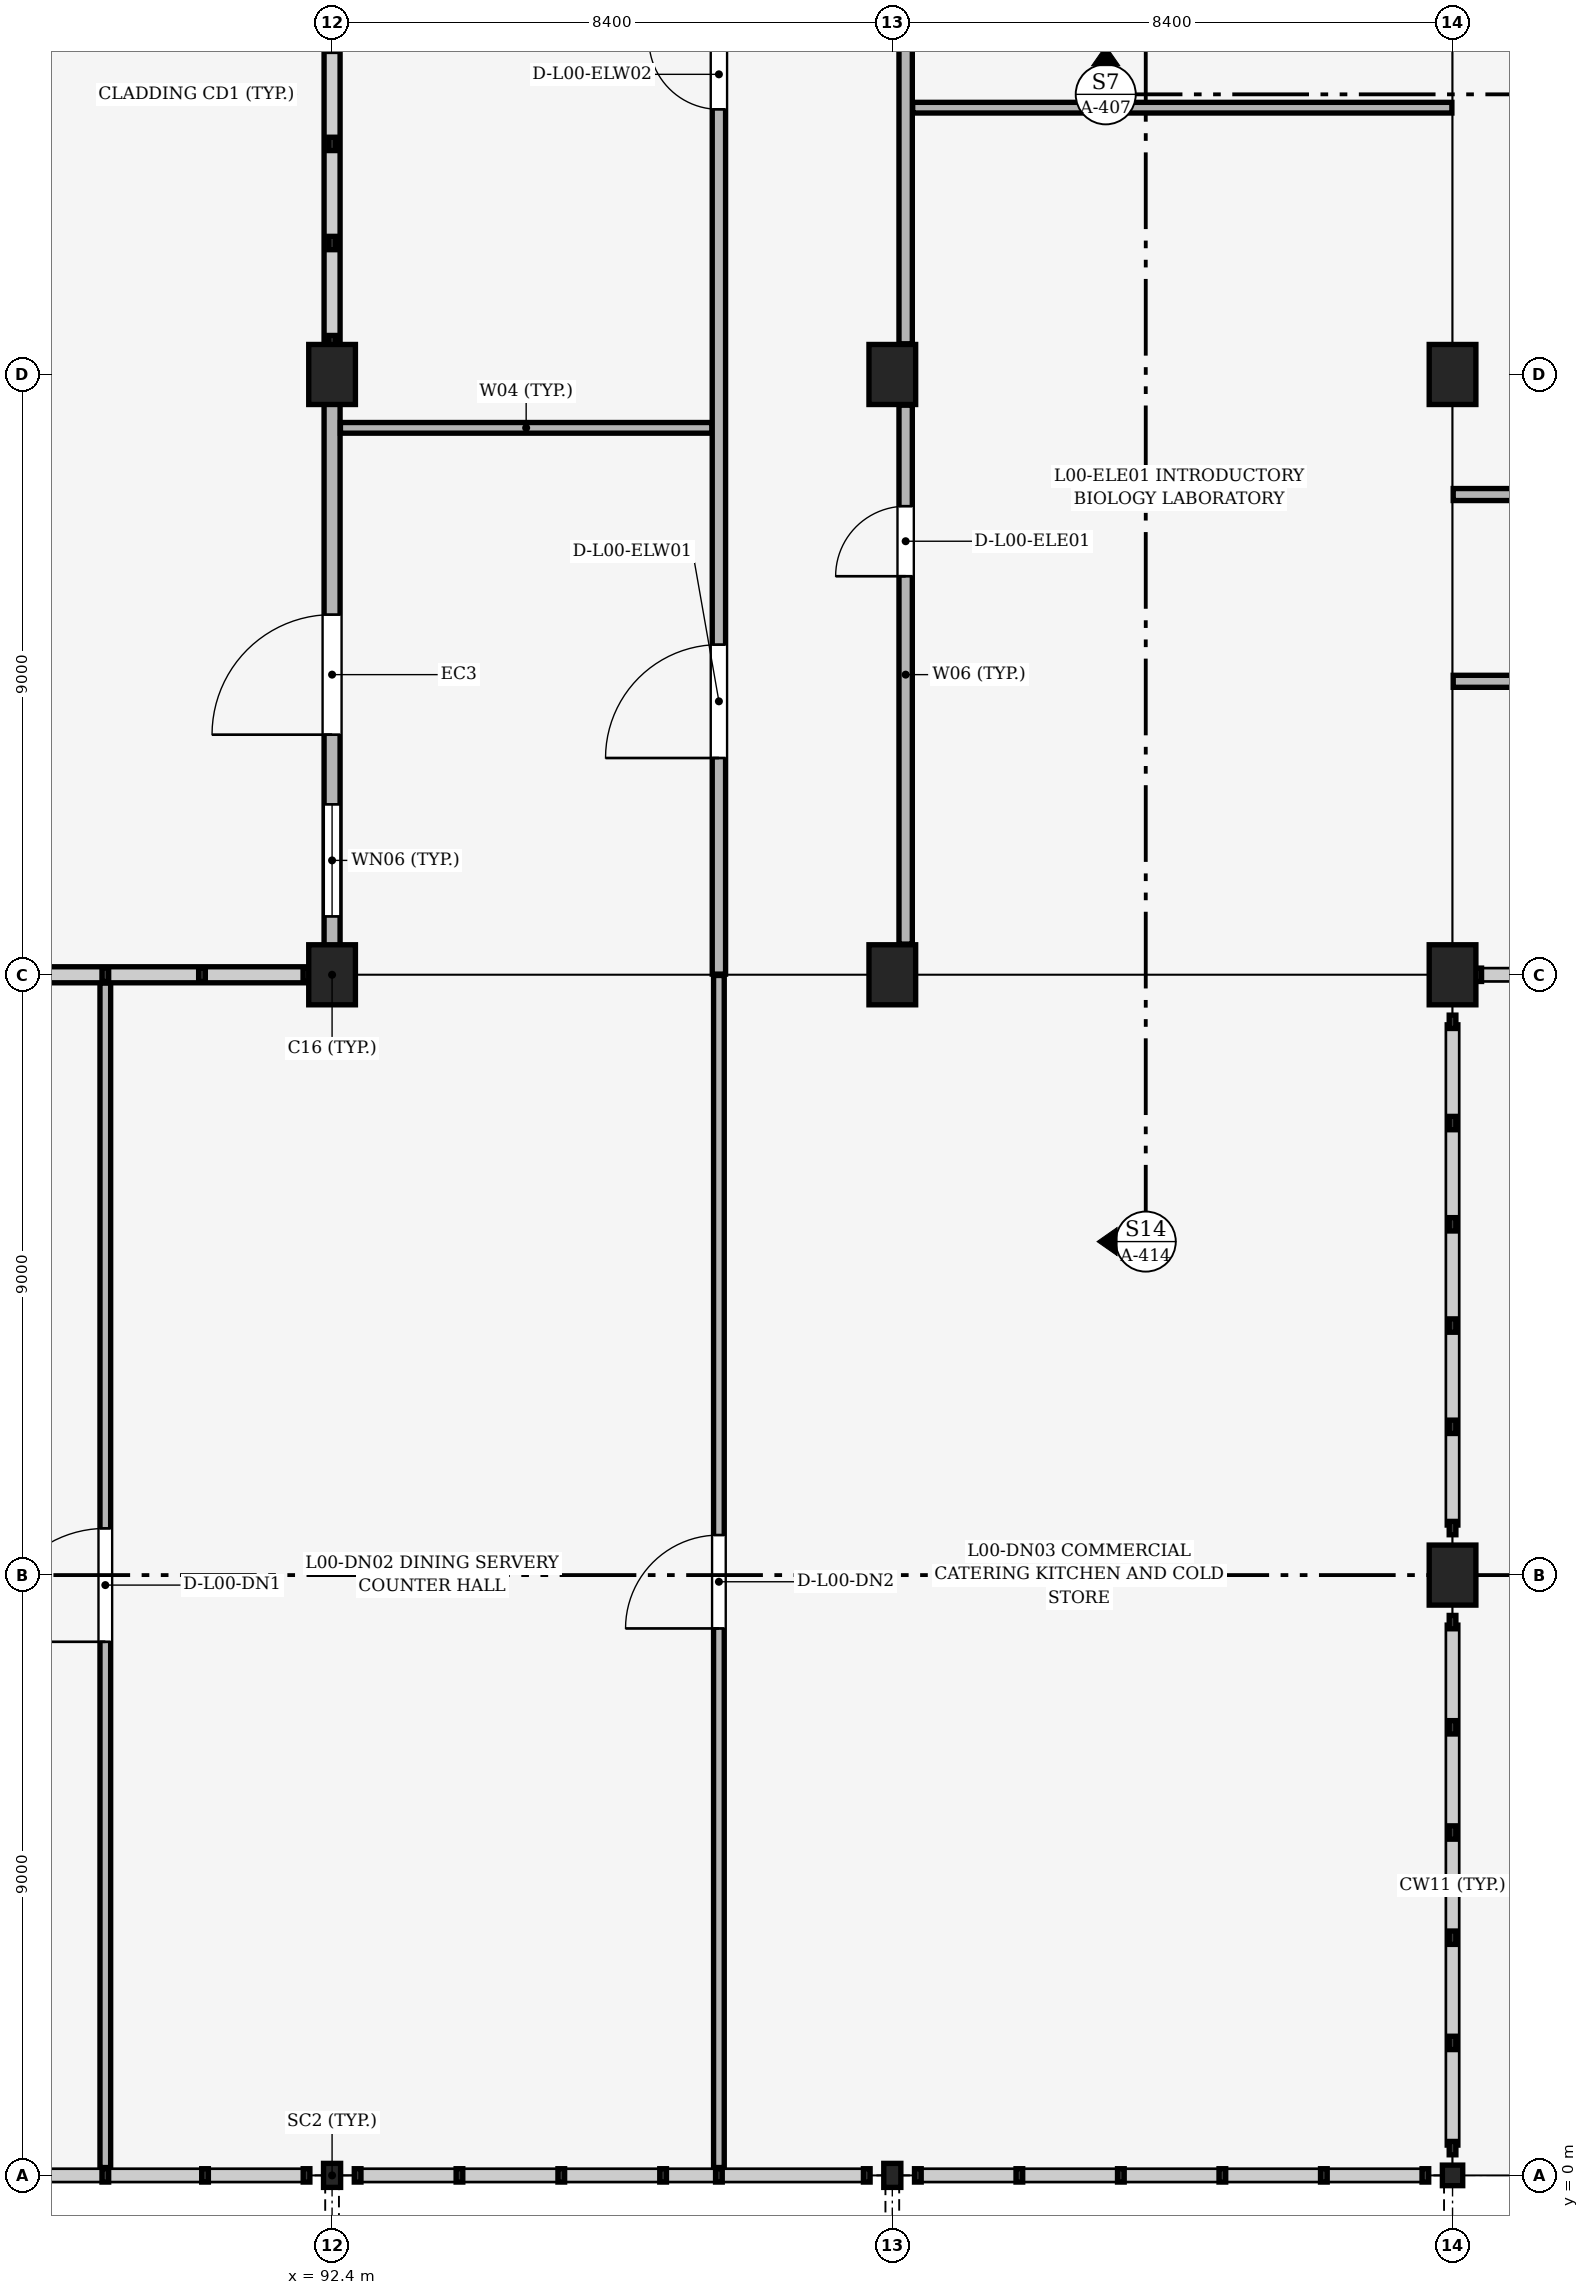
"""IFC4 building model, lengths in metres.
Left out: names, types, materials, properties, quantities, classifications, styles, units other than length and angle.
Written with IfcOpenShell. Run it as: python <this file> out.ifc"""

import sys

from ifc_helpers import new_model, si_unit, direction, frame, frame_2d, origin, origin_2d, place, context, subcontext, project, spatial, rectangle, i_section, extrude, element, fill, save


model = new_model("IFC4")
c1 = context("Model", 3, precision=1e-05, world=origin(), true_north=direction((0.0, 1.0)))
c2 = subcontext(c1, "Body", "Model", "MODEL_VIEW")
j1 = project(units=[si_unit("LENGTHUNIT", "METRE"), si_unit("PLANEANGLEUNIT", "RADIAN")], contexts=[c1])
p1 = place(None, origin())
s1 = spatial("IfcSite", under=j1, at=p1, CompositionType="ELEMENT")
p2 = place(p1, origin())
s2 = spatial("IfcBuilding", under=s1, at=p2, CompositionType="ELEMENT")
p3 = place(p2, origin())
s3 = spatial("IfcBuildingStorey", under=s2, at=p3, CompositionType="ELEMENT", Elevation=0.0)
p4 = place(p3, frame((92.4, 0.0, 0.0), z_axis=(0.0, 0.0, 1.0), x_axis=(1.0, 0.0, 0.0)))
e1 = element("IfcColumn", 1, at=p4, inside=s3, PredefinedType="COLUMN", context=c2, shape_type="SweptSolid", body=[
    extrude(i_section(OverallWidth=0.256, OverallDepth=0.36, WebThickness=0.011, FlangeThickness=0.02, FilletRadius=0.015, at=origin_2d()), origin(), (0.0, 0.0, 1.0), 4.8),
])
for number, where, z_axis, x_axis in (
    (2, (92.4, 18.0, 0.0), (0.0, 0.0, 1.0), (1.0, 0.0, 0.0)),
    (3, (92.4, 27.0, 0.0), (0.0, 0.0, 1.0), (1.0, 0.0, 0.0)),
):
    element("IfcColumn", number, at=place(p3, frame(where, z_axis=z_axis, x_axis=x_axis)), inside=s3, PredefinedType="COLUMN", context=c2, shape_type="SweptSolid", body=[
        extrude(rectangle(XDim=0.7, YDim=0.9, at=origin_2d()), origin(), (0.0, 0.0, 1.0), 4.8),
    ])
p5 = place(p3, frame((100.8, 0.0, 0.0), z_axis=(0.0, 0.0, 1.0), x_axis=(1.0, 0.0, 0.0)))
e4 = element("IfcColumn", 4, at=p5, inside=s3, PredefinedType="COLUMN", context=c2, shape_type="SweptSolid", body=[
    extrude(i_section(OverallWidth=0.256, OverallDepth=0.36, WebThickness=0.011, FlangeThickness=0.02, FilletRadius=0.015, at=origin_2d()), origin(), (0.0, 0.0, 1.0), 4.8),
])
for number, where, z_axis, x_axis in (
    (5, (100.8, 18.0, 0.0), (0.0, 0.0, 1.0), (1.0, 0.0, 0.0)),
    (6, (100.8, 27.0, 0.0), (0.0, 0.0, 1.0), (1.0, 0.0, 0.0)),
):
    element("IfcColumn", number, at=place(p3, frame(where, z_axis=z_axis, x_axis=x_axis)), inside=s3, PredefinedType="COLUMN", context=c2, shape_type="SweptSolid", body=[
        extrude(rectangle(XDim=0.7, YDim=0.9, at=origin_2d()), origin(), (0.0, 0.0, 1.0), 4.8),
    ])
p6 = place(p3, frame((109.2, 0.0, 0.0), z_axis=(0.0, 0.0, 1.0), x_axis=(1.0, 0.0, 0.0)))
e7 = element("IfcColumn", 7, at=p6, inside=s3, PredefinedType="COLUMN", context=c2, shape_type="SweptSolid", body=[
    extrude(i_section(OverallWidth=0.305, OverallDepth=0.308, WebThickness=0.01, FlangeThickness=0.015, FilletRadius=0.013, at=origin_2d()), origin(), (0.0, 0.0, 1.0), 4.8),
])
for number, where, z_axis, x_axis in (
    (8, (109.2, 9.0, 0.0), (0.0, 0.0, 1.0), (1.0, 0.0, 0.0)),
    (9, (109.2, 18.0, 0.0), (0.0, 0.0, 1.0), (1.0, 0.0, 0.0)),
    (10, (109.2, 27.0, 0.0), (0.0, 0.0, 1.0), (1.0, 0.0, 0.0)),
):
    element("IfcColumn", number, at=place(p3, frame(where, z_axis=z_axis, x_axis=x_axis)), inside=s3, PredefinedType="COLUMN", context=c2, shape_type="SweptSolid", body=[
        extrude(rectangle(XDim=0.7, YDim=0.9, at=origin_2d()), origin(), (0.0, 0.0, 1.0), 4.8),
    ])
p7 = place(p3, frame((92.4, 18.425, 0.0), z_axis=(0.0, 0.0, 1.0), x_axis=(0.0, 1.0, 0.0)))
e11 = element("IfcWall", 11, at=p7, inside=s3, PredefinedType="SOLIDWALL", context=c2, shape_type="SweptSolid", body=[
    extrude(rectangle(XDim=8.15, YDim=0.24, at=frame_2d((4.075, 0.0))), origin(), (0.0, 0.0, 1.0), 3.72),
])
p8 = place(p7, frame((3.175, 0.0, 0.0)))
e12 = element("IfcOpeningElement", 12, at=p8, cuts=e11, PredefinedType="OPENING", context=c2, shape_type="SweptSolid", body=[
    extrude(rectangle(XDim=1.8, YDim=2.35, at=frame_2d((0.9, 1.175))), frame((0.0, 0.13, 0.0), z_axis=(0.0, -1.0, 0.0), x_axis=(1.0, 0.0, 0.0)), (0.0, 0.0, 1.0), 0.26),
])
p9 = place(p7, frame((0.45, 0.0, 0.95)))
e13 = element("IfcOpeningElement", 13, at=p9, cuts=e11, PredefinedType="OPENING", context=c2, shape_type="SweptSolid", body=[
    extrude(rectangle(XDim=1.68, YDim=2.1, at=frame_2d((0.84, 1.05))), frame((0.0, 0.13, 0.0), z_axis=(0.0, -1.0, 0.0), x_axis=(1.0, 0.0, 0.0)), (0.0, 0.0, 1.0), 0.26),
])
p10 = place(p3, frame((92.4, 27.425, 0.0), z_axis=(0.0, 0.0, 1.0), x_axis=(0.0, 1.0, 0.0)))
e14 = element("IfcWall", 14, at=p10, inside=s3, PredefinedType="SOLIDWALL", context=c2, shape_type="SweptSolid", body=[
    extrude(rectangle(XDim=7.55, YDim=0.24, at=frame_2d((3.775, 0.0))), origin(), (0.0, 0.0, 1.0), 1.15),
])
p11 = place(p3, frame((84.127, 18.0, 0.0), z_axis=(0.0, 0.0, 1.0), x_axis=(1.0, 0.0, 0.0)))
e15 = element("IfcWall", 15, at=p11, inside=s3, PredefinedType="SOLIDWALL", context=c2, shape_type="SweptSolid", body=[
    extrude(rectangle(XDim=7.948, YDim=0.24, at=frame_2d((3.974, 0.0))), origin(), (0.0, 0.0, 1.0), 1.1),
])
p12 = place(p3, frame((92.525, 26.2, 0.0), z_axis=(0.0, 0.0, 1.0), x_axis=(1.0, 0.0, 0.0)))
e16 = element("IfcWall", 16, at=p12, inside=s3, PredefinedType="PARTITIONING", context=c2, shape_type="SweptSolid", body=[
    extrude(rectangle(XDim=5.57, YDim=0.16, at=frame_2d((2.785, 0.0))), origin(), (0.0, 0.0, 1.0), 4.5),
])
p13 = place(p3, frame((98.2, 18.01, 0.0), z_axis=(0.0, 0.0, 1.0), x_axis=(0.0, 1.0, 0.0)))
e17 = element("IfcWall", 17, at=p13, inside=s3, PredefinedType="PARTITIONING", context=c2, shape_type="SweptSolid", body=[
    extrude(rectangle(XDim=67.78, YDim=0.2, at=frame_2d((33.89, 0.0))), origin(), (0.0, 0.0, 1.0), 4.5),
])
p14 = place(p13, frame((3.24, 0.0, 0.0)))
e18 = element("IfcOpeningElement", 18, at=p14, cuts=e17, PredefinedType="OPENING", context=c2, shape_type="SweptSolid", body=[
    extrude(rectangle(XDim=1.7, YDim=2.25, at=frame_2d((0.85, 1.125))), frame((0.0, 0.11, 0.0), z_axis=(0.0, -1.0, 0.0), x_axis=(1.0, 0.0, 0.0)), (0.0, 0.0, 1.0), 0.22),
])
p15 = place(p13, frame((12.965, 0.0, 0.0)))
e19 = element("IfcOpeningElement", 19, at=p15, cuts=e17, PredefinedType="OPENING", context=c2, shape_type="SweptSolid", body=[
    extrude(rectangle(XDim=1.05, YDim=2.2, at=frame_2d((0.525, 1.1))), frame((0.0, 0.11, 0.0), z_axis=(0.0, -1.0, 0.0), x_axis=(1.0, 0.0, 0.0)), (0.0, 0.0, 1.0), 0.22),
])
p16 = place(p13, frame((21.94, 0.0, 0.0)))
e20 = element("IfcOpeningElement", 20, at=p16, cuts=e17, PredefinedType="OPENING", context=c2, shape_type="SweptSolid", body=[
    extrude(rectangle(XDim=1.1, YDim=2.15, at=frame_2d((0.55, 1.075))), frame((0.0, 0.11, 0.0), z_axis=(0.0, -1.0, 0.0), x_axis=(1.0, 0.0, 0.0)), (0.0, 0.0, 1.0), 0.22),
])
p17 = place(p13, frame((28.515, 0.0, 0.0)))
e21 = element("IfcOpeningElement", 21, at=p17, cuts=e17, PredefinedType="OPENING", context=c2, shape_type="SweptSolid", body=[
    extrude(rectangle(XDim=0.95, YDim=2.2, at=frame_2d((0.475, 1.1))), frame((0.0, 0.11, 0.0), z_axis=(0.0, -1.0, 0.0), x_axis=(1.0, 0.0, 0.0)), (0.0, 0.0, 1.0), 0.22),
])
p18 = place(p13, frame((34.115, 0.0, 0.0)))
e22 = element("IfcOpeningElement", 22, at=p18, cuts=e17, PredefinedType="OPENING", context=c2, shape_type="SweptSolid", body=[
    extrude(rectangle(XDim=0.95, YDim=2.2, at=frame_2d((0.475, 1.1))), frame((0.0, 0.11, 0.0), z_axis=(0.0, -1.0, 0.0), x_axis=(1.0, 0.0, 0.0)), (0.0, 0.0, 1.0), 0.22),
])
p19 = place(p13, frame((39.015, 0.0, 0.0)))
e23 = element("IfcOpeningElement", 23, at=p19, cuts=e17, PredefinedType="OPENING", context=c2, shape_type="SweptSolid", body=[
    extrude(rectangle(XDim=0.95, YDim=2.1, at=frame_2d((0.475, 1.05))), frame((0.0, 0.11, 0.0), z_axis=(0.0, -1.0, 0.0), x_axis=(1.0, 0.0, 0.0)), (0.0, 0.0, 1.0), 0.22),
])
p20 = place(p13, frame((47.19, 0.0, 0.0)))
e24 = element("IfcOpeningElement", 24, at=p20, cuts=e17, PredefinedType="OPENING", context=c2, shape_type="SweptSolid", body=[
    extrude(rectangle(XDim=1.0, YDim=2.25, at=frame_2d((0.5, 1.125))), frame((0.0, 0.11, 0.0), z_axis=(0.0, -1.0, 0.0), x_axis=(1.0, 0.0, 0.0)), (0.0, 0.0, 1.0), 0.22),
])
p21 = place(p13, frame((60.24, 0.0, 0.0)))
e25 = element("IfcOpeningElement", 25, at=p21, cuts=e17, PredefinedType="OPENING", context=c2, shape_type="SweptSolid", body=[
    extrude(rectangle(XDim=1.1, YDim=2.15, at=frame_2d((0.55, 1.075))), frame((0.0, 0.11, 0.0), z_axis=(0.0, -1.0, 0.0), x_axis=(1.0, 0.0, 0.0)), (0.0, 0.0, 1.0), 0.22),
])
p22 = place(p3, frame((101.105, 31.0, 0.0), z_axis=(0.0, 0.0, 1.0), x_axis=(1.0, 0.0, 0.0)))
e26 = element("IfcWall", 26, at=p22, inside=s3, PredefinedType="PARTITIONING", context=c2, shape_type="SweptSolid", body=[
    extrude(rectangle(XDim=8.085, YDim=0.16, at=frame_2d((4.042, 0.0))), origin(), (0.0, 0.0, 1.0), 4.5),
])
p23 = place(p3, frame((101.0, 18.46, 0.0), z_axis=(0.0, 0.0, 1.0), x_axis=(0.0, 1.0, 0.0)))
e27 = element("IfcWall", 27, at=p23, inside=s3, PredefinedType="PARTITIONING", context=c2, shape_type="SweptSolid", body=[
    extrude(rectangle(XDim=8.08, YDim=0.2, at=frame_2d((4.04, 0.0))), origin(), (0.0, 0.0, 1.0), 3.84),
])
p24 = place(p23, frame((5.515, 0.0, 0.0)))
e28 = element("IfcOpeningElement", 28, at=p24, cuts=e27, PredefinedType="OPENING", context=c2, shape_type="SweptSolid", body=[
    extrude(rectangle(XDim=1.05, YDim=2.2, at=frame_2d((0.525, 1.1))), frame((0.0, 0.11, 0.0), z_axis=(0.0, -1.0, 0.0), x_axis=(1.0, 0.0, 0.0)), (0.0, 0.0, 1.0), 0.22),
])
p25 = place(p3, frame((101.0, 27.46, 0.0), z_axis=(0.0, 0.0, 1.0), x_axis=(0.0, 1.0, 0.0)))
e29 = element("IfcWall", 29, at=p25, inside=s3, PredefinedType="PARTITIONING", context=c2, shape_type="SweptSolid", body=[
    extrude(rectangle(XDim=7.48, YDim=0.2, at=frame_2d((3.74, 0.0))), origin(), (0.0, 0.0, 1.0), 3.89),
])
p26 = place(p3, frame((109.21, 25.2, 0.0), z_axis=(0.0, 0.0, 1.0), x_axis=(1.0, 0.0, 0.0)))
e30 = element("IfcWall", 30, at=p26, inside=s3, PredefinedType="PARTITIONING", context=c2, shape_type="SweptSolid", body=[
    extrude(rectangle(XDim=33.58, YDim=0.18, at=frame_2d((16.79, 0.0))), origin(), (0.0, 0.0, 1.0), 4.5),
])
p27 = place(p26, frame((5.04, 0.0, 0.0)))
e31 = element("IfcOpeningElement", 31, at=p27, cuts=e30, PredefinedType="OPENING", context=c2, shape_type="SweptSolid", body=[
    extrude(rectangle(XDim=1.1, YDim=2.3, at=frame_2d((0.55, 1.15))), frame((0.0, 0.1, 0.0), z_axis=(0.0, -1.0, 0.0), x_axis=(1.0, 0.0, 0.0)), (0.0, 0.0, 1.0), 0.2),
])
p28 = place(p26, frame((16.24, 0.0, 0.0)))
e32 = element("IfcOpeningElement", 32, at=p28, cuts=e30, PredefinedType="OPENING", context=c2, shape_type="SweptSolid", body=[
    extrude(rectangle(XDim=1.1, YDim=2.3, at=frame_2d((0.55, 1.15))), frame((0.0, 0.1, 0.0), z_axis=(0.0, -1.0, 0.0), x_axis=(1.0, 0.0, 0.0)), (0.0, 0.0, 1.0), 0.2),
])
p29 = place(p26, frame((27.39, 0.0, 0.0)))
e33 = element("IfcOpeningElement", 33, at=p29, cuts=e30, PredefinedType="OPENING", context=c2, shape_type="SweptSolid", body=[
    extrude(rectangle(XDim=1.2, YDim=2.4, at=frame_2d((0.6, 1.2))), frame((0.0, 0.1, 0.0), z_axis=(0.0, -1.0, 0.0), x_axis=(1.0, 0.0, 0.0)), (0.0, 0.0, 1.0), 0.2),
])
p30 = place(p3, frame((109.21, 22.4, 0.0), z_axis=(0.0, 0.0, 1.0), x_axis=(1.0, 0.0, 0.0)))
e34 = element("IfcWall", 34, at=p30, inside=s3, PredefinedType="PARTITIONING", context=c2, shape_type="SweptSolid", body=[
    extrude(rectangle(XDim=16.98, YDim=0.18, at=frame_2d((8.49, 0.0))), origin(), (0.0, 0.0, 1.0), 4.5),
])
p31 = place(p30, frame((3.54, 0.0, 0.0)))
e35 = element("IfcOpeningElement", 35, at=p31, cuts=e34, PredefinedType="OPENING", context=c2, shape_type="SweptSolid", body=[
    extrude(rectangle(XDim=1.1, YDim=2.3, at=frame_2d((0.55, 1.15))), frame((0.0, 0.1, 0.0), z_axis=(0.0, -1.0, 0.0), x_axis=(1.0, 0.0, 0.0)), (0.0, 0.0, 1.0), 0.2),
])
p32 = place(p30, frame((11.74, 0.0, 0.0)))
e36 = element("IfcOpeningElement", 36, at=p32, cuts=e34, PredefinedType="OPENING", context=c2, shape_type="SweptSolid", body=[
    extrude(rectangle(XDim=1.7, YDim=2.25, at=frame_2d((0.85, 1.125))), frame((0.0, 0.1, 0.0), z_axis=(0.0, -1.0, 0.0), x_axis=(1.0, 0.0, 0.0)), (0.0, 0.0, 1.0), 0.2),
])
p33 = place(p3, frame((89.0, 0.117, 0.0), z_axis=(0.0, 0.0, 1.0), x_axis=(0.0, 1.0, 0.0)))
e37 = element("IfcWall", 37, at=p33, inside=s3, PredefinedType="PARTITIONING", context=c2, shape_type="SweptSolid", body=[
    extrude(rectangle(XDim=17.758, YDim=0.16, at=frame_2d((8.879, 0.0))), origin(), (0.0, 0.0, 1.0), 4.5),
])
p34 = place(p33, frame((7.883, 0.0, 0.0)))
e38 = element("IfcOpeningElement", 38, at=p34, cuts=e37, PredefinedType="OPENING", context=c2, shape_type="SweptSolid", body=[
    extrude(rectangle(XDim=1.7, YDim=2.25, at=frame_2d((0.85, 1.125))), frame((0.0, 0.09, 0.0), z_axis=(0.0, -1.0, 0.0), x_axis=(1.0, 0.0, 0.0)), (0.0, 0.0, 1.0), 0.18),
])
p35 = place(p3, frame((98.2, 0.117, 0.0), z_axis=(0.0, 0.0, 1.0), x_axis=(0.0, 1.0, 0.0)))
e39 = element("IfcWall", 39, at=p35, inside=s3, PredefinedType="PARTITIONING", context=c2, shape_type="SweptSolid", body=[
    extrude(rectangle(XDim=17.873, YDim=0.16, at=frame_2d((8.936, 0.0))), origin(), (0.0, 0.0, 1.0), 4.5),
])
p36 = place(p35, frame((8.083, 0.0, 0.0)))
e40 = element("IfcOpeningElement", 40, at=p36, cuts=e39, PredefinedType="OPENING", context=c2, shape_type="SweptSolid", body=[
    extrude(rectangle(XDim=1.4, YDim=2.2, at=frame_2d((0.7, 1.1))), frame((0.0, 0.09, 0.0), z_axis=(0.0, -1.0, 0.0), x_axis=(1.0, 0.0, 0.0)), (0.0, 0.0, 1.0), 0.18),
])
p37 = place(p8, origin())
e41 = element("IfcDoor", 41, at=p37, inside=s3, OperationType="DOUBLE_DOOR_SINGLE_SWING", PredefinedType="DOOR", context=c2, shape_type="SweptSolid", body=[
    extrude(rectangle(XDim=1.8, YDim=2.35, at=frame_2d((0.9, 1.175))), frame((0.0, 0.025, 0.0), z_axis=(0.0, -1.0, 0.0), x_axis=(1.0, 0.0, 0.0)), (0.0, 0.0, 1.0), 0.05),
])
fill(e12, e41)
p38 = place(p9, origin())
e42 = element("IfcWindow", 42, at=p38, inside=s3, PartitioningType="SINGLE_PANEL", PredefinedType="WINDOW", context=c2, shape_type="SweptSolid", body=[
    extrude(rectangle(XDim=1.68, YDim=2.1, at=frame_2d((0.84, 1.05))), frame((0.0, 0.03, 0.0), z_axis=(0.0, -1.0, 0.0), x_axis=(1.0, 0.0, 0.0)), (0.0, 0.0, 1.0), 0.06),
])
fill(e13, e42)
p39 = place(p14, origin())
e43 = element("IfcDoor", 43, at=p39, inside=s3, OperationType="DOUBLE_DOOR_SINGLE_SWING", PredefinedType="DOOR", context=c2, shape_type="SweptSolid", body=[
    extrude(rectangle(XDim=1.7, YDim=2.25, at=frame_2d((0.85, 1.125))), frame((0.0, 0.025, 0.0), z_axis=(0.0, -1.0, 0.0), x_axis=(1.0, 0.0, 0.0)), (0.0, 0.0, 1.0), 0.05),
])
fill(e18, e43)
p40 = place(p15, origin())
e44 = element("IfcDoor", 44, at=p40, inside=s3, OperationType="SINGLE_SWING_RIGHT", PredefinedType="DOOR", context=c2, shape_type="SweptSolid", body=[
    extrude(rectangle(XDim=1.05, YDim=2.2, at=frame_2d((0.525, 1.1))), frame((0.0, 0.025, 0.0), z_axis=(0.0, -1.0, 0.0), x_axis=(1.0, 0.0, 0.0)), (0.0, 0.0, 1.0), 0.05),
])
fill(e19, e44)
p41 = place(p24, origin())
e45 = element("IfcDoor", 45, at=p41, inside=s3, OperationType="SINGLE_SWING_LEFT", PredefinedType="DOOR", context=c2, shape_type="SweptSolid", body=[
    extrude(rectangle(XDim=1.05, YDim=2.2, at=frame_2d((0.525, 1.1))), frame((0.0, 0.025, 0.0), z_axis=(0.0, -1.0, 0.0), x_axis=(1.0, 0.0, 0.0)), (0.0, 0.0, 1.0), 0.05),
])
fill(e28, e45)
p42 = place(p34, origin())
e46 = element("IfcDoor", 46, at=p42, inside=s3, OperationType="DOUBLE_DOOR_SINGLE_SWING", PredefinedType="DOOR", context=c2, shape_type="SweptSolid", body=[
    extrude(rectangle(XDim=1.7, YDim=2.25, at=frame_2d((0.85, 1.125))), frame((0.0, 0.025, 0.0), z_axis=(0.0, -1.0, 0.0), x_axis=(1.0, 0.0, 0.0)), (0.0, 0.0, 1.0), 0.05),
])
fill(e38, e46)
p43 = place(p36, origin())
e47 = element("IfcDoor", 47, at=p43, inside=s3, OperationType="DOUBLE_DOOR_SINGLE_SWING", PredefinedType="DOOR", context=c2, shape_type="SweptSolid", body=[
    extrude(rectangle(XDim=1.4, YDim=2.2, at=frame_2d((0.7, 1.1))), frame((0.0, 0.025, 0.0), z_axis=(0.0, -1.0, 0.0), x_axis=(1.0, 0.0, 0.0)), (0.0, 0.0, 1.0), 0.05),
])
fill(e40, e47)
save(model, sys.argv[1])
